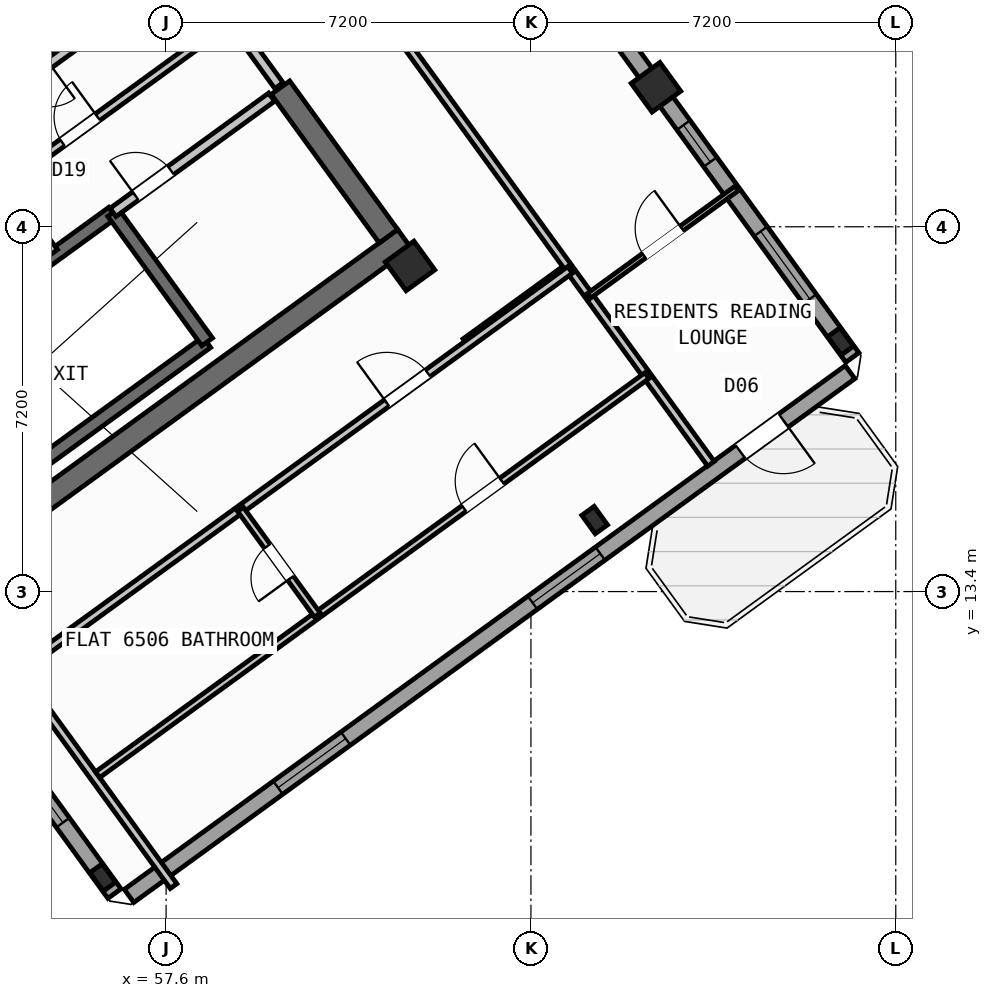
"""IFC4 building model, lengths in metres.
Left out: names, types, materials, properties, quantities, classifications, styles, units other than length and angle.
Written with IfcOpenShell. Run it as: python <this file> out.ifc"""

import sys

from ifc_helpers import new_model, si_unit, direction, frame, frame_2d, origin, origin_2d, place, context, subcontext, project, spatial, rectangle, hollow_rectangle, i_section, extrude, source, transform, mapped, element, fill, save


model = new_model("IFC4")
c1 = context("Model", 3, precision=1e-05, world=origin(), true_north=direction((0.0, 1.0)))
c2 = subcontext(c1, "Body", "Model", "MODEL_VIEW")
j1 = project(units=[si_unit("LENGTHUNIT", "METRE"), si_unit("PLANEANGLEUNIT", "RADIAN")], contexts=[c1])
p1 = place(None, origin())
s1 = spatial("IfcSite", under=j1, at=p1, CompositionType="ELEMENT")
p2 = place(p1, origin())
s2 = spatial("IfcBuilding", under=s1, at=p2, CompositionType="ELEMENT")
p3 = place(p2, frame((0.0, 0.0, 259.2)))
s3 = spatial("IfcBuildingStorey", under=s2, at=p3, CompositionType="ELEMENT", Elevation=259.2)
p4 = place(p3, frame((52.399, 13.169, 0.0), z_axis=(0.0, 0.0, 1.0), x_axis=(0.809022352778, 0.587777877013, 0.0)))
e1 = element("IfcWall", 1, at=p4, inside=s3, PredefinedType="SHEAR", context=c2, shape_type="SweptSolid", body=[
    extrude(rectangle(XDim=12.24, YDim=0.45, at=frame_2d((6.12, 0.0))), origin(), (0.0, 0.0, 1.0), 3.35),
])
p5 = place(p3, frame((61.988, 20.413, 0.0), z_axis=(0.0, 0.0, 1.0), x_axis=(-0.587819244441, 0.808992296542, 0.0)))
e2 = element("IfcWall", 2, at=p5, inside=s3, PredefinedType="SHEAR", context=c2, shape_type="SweptSolid", body=[
    extrude(rectangle(XDim=3.625, YDim=0.45, at=frame_2d((1.812, 0.0))), origin(), (0.0, 0.0, 1.0), 3.35),
])
m1 = source(origin(), c2, "Body", "SweptSolid", [
    extrude(i_section(OverallWidth=0.3, OverallDepth=0.45, WebThickness=0.014, FlangeThickness=0.026, at=origin_2d()), origin(), (0.0, 0.0, 1.0), 3.6),
])
for number, where, z_axis, x_axis in (
    (3, (56.35, 7.758, 0.0), (0.0, 0.0, 1.0), (0.809, 0.588, 0.0)),
    (4, (66.058, 14.811, 0.0), (0.0, 0.0, 1.0), (0.809, 0.588, 0.0)),
):
    element("IfcColumn", number, at=place(p3, frame(where, z_axis=z_axis, x_axis=x_axis)), inside=s3, PredefinedType="COLUMN", context=c2, shape_type="MappedRepresentation", body=[
        mapped(m1, transform((0.0, 0.0, 0.0), scale=1.0)),
    ])
m2 = source(origin(), c2, "Body", "SweptSolid", [
    extrude(hollow_rectangle(XDim=0.7, YDim=0.7, WallThickness=0.028, at=origin_2d()), origin(), (0.0, 0.0, 1.0), 3.6),
])
p6 = place(p3, frame((62.414, 19.827, 0.0), z_axis=(0.0, 0.0, 1.0), x_axis=(0.809016994375, 0.587785252292, 0.0)))
e5 = element("IfcColumn", 5, at=p6, inside=s3, PredefinedType="COLUMN", context=c2, shape_type="MappedRepresentation", body=[
    mapped(m2, transform((0.0, 0.0, 0.0), scale=1.0)),
])
p7 = place(p3, frame((70.912, 18.338, 0.0), z_axis=(0.0, 0.0, 1.0), x_axis=(0.809016994375, 0.587785252292, 0.0)))
e6 = element("IfcColumn", 6, at=p7, inside=s3, PredefinedType="COLUMN", context=c2, shape_type="MappedRepresentation", body=[
    mapped(m1, transform((0.0, 0.0, 0.0), scale=1.0)),
])
p8 = place(p3, frame((67.268, 23.354, 0.0), z_axis=(0.0, 0.0, 1.0), x_axis=(0.809016994375, 0.587785252292, 0.0)))
e7 = element("IfcColumn", 7, at=p8, inside=s3, PredefinedType="COLUMN", context=c2, shape_type="MappedRepresentation", body=[
    mapped(m2, transform((0.0, 0.0, 0.0), scale=1.0)),
])
p9 = place(p3, frame((58.455, 35.484, 0.0), z_axis=(0.0, 0.0, 1.0), x_axis=(0.587783625747, -0.809018176127, 0.0)))
e8 = element("IfcWall", 8, at=p9, inside=s3, PredefinedType="STANDARD", context=c2, shape_type="SweptSolid", body=[
    extrude(rectangle(XDim=21.587, YDim=0.32, at=frame_2d((10.794, 0.0))), origin(), (0.0, 0.0, 1.0), 3.35),
])
p10 = place(p9, frame((1.744, 0.0, 0.9)))
e9 = element("IfcOpeningElement", 9, at=p10, cuts=e8, PredefinedType="OPENING", context=c2, shape_type="SweptSolid", body=[
    extrude(rectangle(XDim=1.65, YDim=1.45, at=frame_2d((0.825, 0.725))), frame((0.0, 0.17, 0.0), z_axis=(0.0, -1.0, 0.0), x_axis=(1.0, 0.0, 0.0)), (0.0, 0.0, 1.0), 0.34),
])
p11 = place(p9, frame((4.694, 0.0, 0.9)))
e10 = element("IfcOpeningElement", 10, at=p11, cuts=e8, PredefinedType="OPENING", context=c2, shape_type="SweptSolid", body=[
    extrude(rectangle(XDim=1.65, YDim=1.45, at=frame_2d((0.825, 0.725))), frame((0.0, 0.17, 0.0), z_axis=(0.0, -1.0, 0.0), x_axis=(1.0, 0.0, 0.0)), (0.0, 0.0, 1.0), 0.34),
])
p12 = place(p9, frame((11.934, 0.0, 0.95)))
e11 = element("IfcOpeningElement", 11, at=p12, cuts=e8, PredefinedType="OPENING", context=c2, shape_type="SweptSolid", body=[
    extrude(rectangle(XDim=1.95, YDim=1.35, at=frame_2d((0.975, 0.675))), frame((0.0, 0.17, 0.0), z_axis=(0.0, -1.0, 0.0), x_axis=(1.0, 0.0, 0.0)), (0.0, 0.0, 1.0), 0.34),
])
p13 = place(p9, frame((15.917, 0.0, 1.0)))
e12 = element("IfcOpeningElement", 12, at=p13, cuts=e8, PredefinedType="OPENING", context=c2, shape_type="SweptSolid", body=[
    extrude(rectangle(XDim=0.9, YDim=1.25, at=frame_2d((0.45, 0.625))), frame((0.0, 0.17, 0.0), z_axis=(0.0, -1.0, 0.0), x_axis=(1.0, 0.0, 0.0)), (0.0, 0.0, 1.0), 0.34),
])
p14 = place(p9, frame((18.51, 0.0, 0.9)))
e13 = element("IfcOpeningElement", 13, at=p14, cuts=e8, PredefinedType="OPENING", context=c2, shape_type="SweptSolid", body=[
    extrude(rectangle(XDim=1.65, YDim=1.45, at=frame_2d((0.825, 0.725))), frame((0.0, 0.17, 0.0), z_axis=(0.0, -1.0, 0.0), x_axis=(1.0, 0.0, 0.0)), (0.0, 0.0, 1.0), 0.34),
])
p15 = place(p3, frame((71.098, 17.731, 0.0), z_axis=(0.0, 0.0, 1.0), x_axis=(-0.809021120468, -0.587779573171, 0.0)))
e14 = element("IfcWall", 14, at=p15, inside=s3, PredefinedType="STANDARD", context=c2, shape_type="SweptSolid", body=[
    extrude(rectangle(XDim=17.588, YDim=0.32, at=frame_2d((8.794, 0.0))), origin(), (0.0, 0.0, 1.0), 3.35),
])
p16 = place(p15, frame((1.624, 0.0, 0.0)))
e15 = element("IfcOpeningElement", 15, at=p16, cuts=e14, PredefinedType="OPENING", context=c2, shape_type="SweptSolid", body=[
    extrude(rectangle(XDim=1.05, YDim=2.15, at=frame_2d((0.525, 1.075))), frame((0.0, 0.17, 0.0), z_axis=(0.0, -1.0, 0.0), x_axis=(1.0, 0.0, 0.0)), (0.0, 0.0, 1.0), 0.34),
])
p17 = place(p15, frame((6.094, 0.0, 0.9)))
e16 = element("IfcOpeningElement", 16, at=p17, cuts=e14, PredefinedType="OPENING", context=c2, shape_type="SweptSolid", body=[
    extrude(rectangle(XDim=1.65, YDim=1.45, at=frame_2d((0.825, 0.725))), frame((0.0, 0.17, 0.0), z_axis=(0.0, -1.0, 0.0), x_axis=(1.0, 0.0, 0.0)), (0.0, 0.0, 1.0), 0.34),
])
p18 = place(p15, frame((12.304, 0.0, 0.9)))
e17 = element("IfcOpeningElement", 17, at=p18, cuts=e14, PredefinedType="OPENING", context=c2, shape_type="SweptSolid", body=[
    extrude(rectangle(XDim=1.65, YDim=1.45, at=frame_2d((0.825, 0.725))), frame((0.0, 0.17, 0.0), z_axis=(0.0, -1.0, 0.0), x_axis=(1.0, 0.0, 0.0)), (0.0, 0.0, 1.0), 0.34),
])
p19 = place(p3, frame((56.581, 7.439, 0.0), z_axis=(0.0, 0.0, 1.0), x_axis=(-0.587776558368, 0.809023310809, 0.0)))
e18 = element("IfcWall", 18, at=p19, inside=s3, PredefinedType="STANDARD", context=c2, shape_type="SweptSolid", body=[
    extrude(rectangle(XDim=7.385, YDim=0.32, at=frame_2d((3.693, 0.0))), origin(), (0.0, 0.0, 1.0), 3.35),
])
p20 = place(p19, frame((1.731, 0.0, 0.9)))
e19 = element("IfcOpeningElement", 19, at=p20, cuts=e18, PredefinedType="OPENING", context=c2, shape_type="SweptSolid", body=[
    extrude(rectangle(XDim=1.65, YDim=1.45, at=frame_2d((0.825, 0.725))), frame((0.0, 0.17, 0.0), z_axis=(0.0, -1.0, 0.0), x_axis=(1.0, 0.0, 0.0)), (0.0, 0.0, 1.0), 0.34),
])
p21 = place(p3, frame((49.863, 23.44, 0.0), z_axis=(0.0, 0.0, 1.0), x_axis=(0.809003474932, 0.587803859759, 0.0)))
e20 = element("IfcWall", 20, at=p21, inside=s3, PredefinedType="SHEAR", context=c2, shape_type="SweptSolid", body=[
    extrude(rectangle(XDim=7.46, YDim=0.26, at=frame_2d((3.73, 0.0))), origin(), (0.0, 0.0, 1.0), 3.35),
])
p22 = place(p21, frame((0.36, 0.0, 0.0)))
e21 = element("IfcOpeningElement", 21, at=p22, cuts=e20, PredefinedType="OPENING", context=c2, shape_type="SweptSolid", body=[
    extrude(rectangle(XDim=0.86, YDim=2.05, at=frame_2d((0.43, 1.025))), frame((0.0, 0.14, 0.0), z_axis=(0.0, -1.0, 0.0), x_axis=(1.0, 0.0, 0.0)), (0.0, 0.0, 1.0), 0.28),
])
p23 = place(p3, frame((52.472, 14.013, 0.0), z_axis=(0.0, 0.0, 1.0), x_axis=(0.809028366311, 0.587769599847, 0.0)))
e22 = element("IfcWall", 22, at=p23, inside=s3, PredefinedType="SHEAR", context=c2, shape_type="SweptSolid", body=[
    extrude(rectangle(XDim=7.33, YDim=0.26, at=frame_2d((3.665, 0.0))), origin(), (0.0, 0.0, 1.0), 3.35),
])
p24 = place(p3, frame((50.615, 16.57, 0.0), z_axis=(0.0, 0.0, 1.0), x_axis=(0.809028366311, 0.587769599847, 0.0)))
e23 = element("IfcWall", 23, at=p24, inside=s3, PredefinedType="SHEAR", context=c2, shape_type="SweptSolid", body=[
    extrude(rectangle(XDim=7.33, YDim=0.26, at=frame_2d((3.665, 0.0))), origin(), (0.0, 0.0, 1.0), 3.35),
])
p25 = place(p24, frame((0.22, 0.0, 0.0)))
e24 = element("IfcOpeningElement", 24, at=p25, cuts=e23, PredefinedType="OPENING", context=c2, shape_type="SweptSolid", body=[
    extrude(rectangle(XDim=1.1, YDim=2.1, at=frame_2d((0.55, 1.05))), frame((0.0, 0.14, 0.0), z_axis=(0.0, -1.0, 0.0), x_axis=(1.0, 0.0, 0.0)), (0.0, 0.0, 1.0), 0.28),
])
p26 = place(p3, frame((58.41, 18.327, 0.0), z_axis=(0.0, 0.0, 1.0), x_axis=(-0.58776738483, 0.809029975545, 0.0)))
e25 = element("IfcWall", 25, at=p26, inside=s3, PredefinedType="SHEAR", context=c2, shape_type="SweptSolid", body=[
    extrude(rectangle(XDim=3.16, YDim=0.26, at=frame_2d((1.58, 0.0))), origin(), (0.0, 0.0, 1.0), 3.35),
])
p27 = place(p3, frame((56.553, 20.884, 0.0), z_axis=(0.0, 0.0, 1.0), x_axis=(0.809041669066, 0.587751288995, 0.0)))
e26 = element("IfcWall", 26, at=p27, inside=s3, PredefinedType="STANDARD", context=c2, shape_type="SweptSolid", body=[
    extrude(rectangle(XDim=3.868, YDim=0.2, at=frame_2d((1.934, 0.0))), origin(), (0.0, 0.0, 1.0), 3.34),
])
p28 = place(p27, frame((0.55, 0.0, 0.0)))
e27 = element("IfcOpeningElement", 27, at=p28, cuts=e26, PredefinedType="OPENING", context=c2, shape_type="SweptSolid", body=[
    extrude(rectangle(XDim=0.86, YDim=2.05, at=frame_2d((0.43, 1.025))), frame((0.0, 0.11, 0.0), z_axis=(0.0, -1.0, 0.0), x_axis=(1.0, 0.0, 0.0)), (0.0, 0.0, 1.0), 0.22),
])
p29 = place(p3, frame((54.421, 21.436, 0.0), z_axis=(0.0, 0.0, 1.0), x_axis=(0.809013710463, 0.587789772183, 0.0)))
e28 = element("IfcWall", 28, at=p29, inside=s3, PredefinedType="PARTITIONING", context=c2, shape_type="SweptSolid", body=[
    extrude(rectangle(XDim=5.36, YDim=0.16, at=frame_2d((2.68, 0.0))), origin(), (0.0, 0.0, 1.0), 3.34),
])
p30 = place(p29, frame((1.4, 0.0, 0.0)))
e29 = element("IfcOpeningElement", 29, at=p30, cuts=e28, PredefinedType="OPENING", context=c2, shape_type="SweptSolid", body=[
    extrude(rectangle(XDim=0.86, YDim=2.05, at=frame_2d((0.43, 1.025))), frame((0.0, 0.09, 0.0), z_axis=(0.0, -1.0, 0.0), x_axis=(1.0, 0.0, 0.0)), (0.0, 0.0, 1.0), 0.18),
])
p31 = place(p3, frame((55.391, 20.102, 0.0), z_axis=(0.0, 0.0, 1.0), x_axis=(-0.58778447739, 0.809017557374, 0.0)))
e30 = element("IfcWall", 30, at=p31, inside=s3, PredefinedType="PARTITIONING", context=c2, shape_type="SweptSolid", body=[
    extrude(rectangle(XDim=1.65, YDim=0.16, at=frame_2d((0.825, 0.0))), origin(), (0.0, 0.0, 1.0), 3.34),
])
p32 = place(p3, frame((53.425, 22.468, 0.0), z_axis=(0.0, 0.0, 1.0), x_axis=(0.809015945709, 0.587786695655, 0.0)))
e31 = element("IfcWall", 31, at=p32, inside=s3, PredefinedType="STANDARD", context=c2, shape_type="SweptSolid", body=[
    extrude(rectangle(XDim=5.468, YDim=0.2, at=frame_2d((2.734, 0.0))), origin(), (0.0, 0.0, 1.0), 3.34),
])
p33 = place(p32, frame((4.4, 0.0, 0.0)))
e32 = element("IfcOpeningElement", 32, at=p33, cuts=e31, PredefinedType="OPENING", context=c2, shape_type="SweptSolid", body=[
    extrude(rectangle(XDim=0.86, YDim=2.05, at=frame_2d((0.43, 1.025))), frame((0.0, 0.11, 0.0), z_axis=(0.0, -1.0, 0.0), x_axis=(1.0, 0.0, 0.0)), (0.0, 0.0, 1.0), 0.22),
])
p34 = place(p32, frame((1.45, 0.0, 0.0)))
e33 = element("IfcOpeningElement", 33, at=p34, cuts=e31, PredefinedType="OPENING", context=c2, shape_type="SweptSolid", body=[
    extrude(rectangle(XDim=0.86, YDim=2.05, at=frame_2d((0.43, 1.025))), frame((0.0, 0.11, 0.0), z_axis=(0.0, -1.0, 0.0), x_axis=(1.0, 0.0, 0.0)), (0.0, 0.0, 1.0), 0.22),
])
p35 = place(p3, frame((59.827, 23.386, 0.0), z_axis=(0.0, 0.0, 1.0), x_axis=(-0.587803840107, 0.809003489211, 0.0)))
e34 = element("IfcWall", 34, at=p35, inside=s3, PredefinedType="STANDARD", context=c2, shape_type="SweptSolid", body=[
    extrude(rectangle(XDim=2.96, YDim=0.2, at=frame_2d((1.48, 0.0))), origin(), (0.0, 0.0, 1.0), 3.34),
])
p36 = place(p35, frame((1.68, 0.0, 0.0)))
e35 = element("IfcOpeningElement", 35, at=p36, cuts=e34, PredefinedType="OPENING", context=c2, shape_type="SweptSolid", body=[
    extrude(rectangle(XDim=1.0, YDim=2.1, at=frame_2d((0.5, 1.05))), frame((0.0, 0.11, 0.0), z_axis=(0.0, -1.0, 0.0), x_axis=(1.0, 0.0, 0.0)), (0.0, 0.0, 1.0), 0.22),
])
p37 = place(p3, frame((63.507, 18.322, 0.0), z_axis=(0.0, 0.0, 1.0), x_axis=(0.809034604122, 0.587761013791, 0.0)))
e36 = element("IfcWall", 36, at=p37, inside=s3, PredefinedType="PARTITIONING", context=c2, shape_type="SweptSolid", body=[
    extrude(rectangle(XDim=2.51, YDim=0.16, at=frame_2d((1.255, 0.0))), origin(), (0.0, 0.0, 1.0), 3.34),
])
p38 = place(p3, frame((68.353, 15.922, 0.0), z_axis=(0.0, 0.0, 1.0), x_axis=(-0.587783168305, 0.809018508476, 0.0)))
e37 = element("IfcWall", 37, at=p38, inside=s3, PredefinedType="PARTITIONING", context=c2, shape_type="SweptSolid", body=[
    extrude(rectangle(XDim=10.65, YDim=0.16, at=frame_2d((5.325, 0.0))), origin(), (0.0, 0.0, 1.0), 3.34),
])
p39 = place(p3, frame((65.944, 19.238, 0.0), z_axis=(0.0, 0.0, 1.0), x_axis=(0.809013833588, 0.587789602718, 0.0)))
e38 = element("IfcWall", 38, at=p39, inside=s3, PredefinedType="PARTITIONING", context=c2, shape_type="SweptSolid", body=[
    extrude(rectangle(XDim=3.61, YDim=0.11, at=frame_2d((1.805, 0.0))), origin(), (0.0, 0.0, 1.0), 3.34),
])
p40 = place(p39, frame((1.345, 0.0, 0.0)))
e39 = element("IfcOpeningElement", 39, at=p40, cuts=e38, PredefinedType="OPENING", context=c2, shape_type="SweptSolid", body=[
    extrude(rectangle(XDim=0.92, YDim=2.08, at=frame_2d((0.46, 1.04))), frame((0.0, 0.065, 0.0), z_axis=(0.0, -1.0, 0.0), x_axis=(1.0, 0.0, 0.0)), (0.0, 0.0, 1.0), 0.13),
])
p41 = place(p3, frame((53.705, 11.126, 0.0), z_axis=(0.0, 0.0, 1.0), x_axis=(0.809014504436, 0.587788679384, 0.0)))
e40 = element("IfcWall", 40, at=p41, inside=s3, PredefinedType="PARTITIONING", context=c2, shape_type="SweptSolid", body=[
    extrude(rectangle(XDim=14.67, YDim=0.16, at=frame_2d((7.335, 0.0))), origin(), (0.0, 0.0, 1.0), 3.34),
])
p42 = place(p41, frame((10.2, 0.0, 0.0)))
e41 = element("IfcOpeningElement", 41, at=p42, cuts=e40, PredefinedType="OPENING", context=c2, shape_type="SweptSolid", body=[
    extrude(rectangle(XDim=1.0, YDim=2.1, at=frame_2d((0.5, 1.05))), frame((0.0, 0.09, 0.0), z_axis=(0.0, -1.0, 0.0), x_axis=(1.0, 0.0, 0.0)), (0.0, 0.0, 1.0), 0.18),
])
p43 = place(p3, frame((57.747, 7.586, 0.0), z_axis=(0.0, 0.0, 1.0), x_axis=(-0.587784893399, 0.809017255126, 0.0)))
e42 = element("IfcWall", 42, at=p43, inside=s3, PredefinedType="PARTITIONING", context=c2, shape_type="SweptSolid", body=[
    extrude(rectangle(XDim=5.48, YDim=0.16, at=frame_2d((2.74, 0.0))), origin(), (0.0, 0.0, 1.0), 3.34),
])
p44 = place(p3, frame((56.249, 9.785, 0.0), z_axis=(0.0, 0.0, 1.0), x_axis=(0.809011747655, 0.587792473715, 0.0)))
e43 = element("IfcWall", 43, at=p44, inside=s3, PredefinedType="PLUMBINGWALL", context=c2, shape_type="SweptSolid", body=[
    extrude(rectangle(XDim=13.4, YDim=0.14, at=frame_2d((6.7, 0.0))), origin(), (0.0, 0.0, 1.0), 3.34),
])
p45 = place(p44, frame((8.94, 0.0, 0.0)))
e44 = element("IfcOpeningElement", 44, at=p45, cuts=e43, PredefinedType="OPENING", context=c2, shape_type="SweptSolid", body=[
    extrude(rectangle(XDim=0.92, YDim=2.08, at=frame_2d((0.46, 1.04))), frame((0.0, 0.08, 0.0), z_axis=(0.0, -1.0, 0.0), x_axis=(1.0, 0.0, 0.0)), (0.0, 0.0, 1.0), 0.16),
])
p46 = place(p3, frame((60.585, 12.936, 0.0), z_axis=(0.0, 0.0, 1.0), x_axis=(-0.587772116736, 0.809026537752, 0.0)))
e45 = element("IfcWall", 45, at=p46, inside=s3, PredefinedType="PLUMBINGWALL", context=c2, shape_type="SweptSolid", body=[
    extrude(rectangle(XDim=2.58, YDim=0.14, at=frame_2d((1.29, 0.0))), origin(), (0.0, 0.0, 1.0), 3.34),
])
p47 = place(p46, frame((0.9, 0.0, 0.0)))
e46 = element("IfcOpeningElement", 46, at=p47, cuts=e45, PredefinedType="OPENING", context=c2, shape_type="SweptSolid", body=[
    extrude(rectangle(XDim=0.78, YDim=2.05, at=frame_2d((0.39, 1.025))), frame((0.0, 0.08, 0.0), z_axis=(0.0, -1.0, 0.0), x_axis=(1.0, 0.0, 0.0)), (0.0, 0.0, 1.0), 0.16),
])
m3 = source(origin(), c2, "Body", "SweptSolid", [
    extrude(rectangle(XDim=1.05, YDim=2.15, at=frame_2d((0.525, 1.075))), frame((0.0, 0.025, 0.0), z_axis=(0.0, -1.0, 0.0), x_axis=(1.0, 0.0, 0.0)), (0.0, 0.0, 1.0), 0.05),
])
p48 = place(p16, origin())
e47 = element("IfcDoor", 47, at=p48, inside=s3, OperationType="SINGLE_SWING_LEFT", PredefinedType="DOOR", context=c2, shape_type="MappedRepresentation", body=[
    mapped(m3, transform((0.0, 0.0, 0.0), scale=1.0)),
])
fill(e15, e47)
m4 = source(origin(), c2, "Body", "SweptSolid", [
    extrude(rectangle(XDim=0.9, YDim=1.25, at=frame_2d((0.45, 0.625))), frame((0.0, 0.03, 0.0), z_axis=(0.0, -1.0, 0.0), x_axis=(1.0, 0.0, 0.0)), (0.0, 0.0, 1.0), 0.06),
])
p49 = place(p13, origin())
e48 = element("IfcWindow", 48, at=p49, inside=s3, PartitioningType="SINGLE_PANEL", PredefinedType="WINDOW", context=c2, shape_type="MappedRepresentation", body=[
    mapped(m4, transform((0.0, 0.0, 0.0), scale=1.0)),
])
fill(e12, e48)
m5 = source(origin(), c2, "Body", "SweptSolid", [
    extrude(rectangle(XDim=1.65, YDim=1.45, at=frame_2d((0.825, 0.725))), frame((0.0, 0.03, 0.0), z_axis=(0.0, -1.0, 0.0), x_axis=(1.0, 0.0, 0.0)), (0.0, 0.0, 1.0), 0.06),
])
p50 = place(p14, origin())
e49 = element("IfcWindow", 49, at=p50, inside=s3, PartitioningType="SINGLE_PANEL", PredefinedType="WINDOW", context=c2, shape_type="MappedRepresentation", body=[
    mapped(m5, transform((0.0, 0.0, 0.0), scale=1.0)),
])
fill(e13, e49)
p51 = place(p17, origin())
e50 = element("IfcWindow", 50, at=p51, inside=s3, PartitioningType="SINGLE_PANEL", PredefinedType="WINDOW", context=c2, shape_type="MappedRepresentation", body=[
    mapped(m5, transform((0.0, 0.0, 0.0), scale=1.0)),
])
fill(e16, e50)
p52 = place(p18, origin())
e51 = element("IfcWindow", 51, at=p52, inside=s3, PartitioningType="SINGLE_PANEL", PredefinedType="WINDOW", context=c2, shape_type="MappedRepresentation", body=[
    mapped(m5, transform((0.0, 0.0, 0.0), scale=1.0)),
])
fill(e17, e51)
p53 = place(p20, origin())
e52 = element("IfcWindow", 52, at=p53, inside=s3, PartitioningType="SINGLE_PANEL", PredefinedType="WINDOW", context=c2, shape_type="MappedRepresentation", body=[
    mapped(m5, transform((0.0, 0.0, 0.0), scale=1.0)),
])
fill(e19, e52)
m6 = source(origin(), c2, "Body", "SweptSolid", [
    extrude(rectangle(XDim=0.86, YDim=2.05, at=frame_2d((0.43, 1.025))), frame((0.0, 0.025, 0.0), z_axis=(0.0, -1.0, 0.0), x_axis=(1.0, 0.0, 0.0)), (0.0, 0.0, 1.0), 0.05),
])
p54 = place(p30, origin())
e53 = element("IfcDoor", 53, at=p54, inside=s3, OperationType="SINGLE_SWING_RIGHT", PredefinedType="DOOR", context=c2, shape_type="MappedRepresentation", body=[
    mapped(m6, transform((0.0, 0.0, 0.0), scale=1.0)),
])
fill(e29, e53)
p55 = place(p28, origin())
e54 = element("IfcDoor", 54, at=p55, inside=s3, OperationType="SINGLE_SWING_LEFT", PredefinedType="DOOR", context=c2, shape_type="MappedRepresentation", body=[
    mapped(m6, transform((0.0, 0.0, 0.0), scale=1.0)),
])
fill(e27, e54)
m7 = source(origin(), c2, "Body", "SweptSolid", [
    extrude(rectangle(XDim=0.92, YDim=2.08, at=frame_2d((0.46, 1.04))), frame((0.0, 0.025, 0.0), z_axis=(0.0, -1.0, 0.0), x_axis=(1.0, 0.0, 0.0)), (0.0, 0.0, 1.0), 0.05),
])
p56 = place(p40, origin())
e55 = element("IfcDoor", 55, at=p56, inside=s3, OperationType="SINGLE_SWING_RIGHT", PredefinedType="DOOR", context=c2, shape_type="MappedRepresentation", body=[
    mapped(m7, transform((0.0, 0.0, 0.0), scale=1.0)),
])
fill(e39, e55)
m8 = source(origin(), c2, "Body", "SweptSolid", [
    extrude(rectangle(XDim=1.0, YDim=2.1, at=frame_2d((0.5, 1.05))), frame((0.0, 0.025, 0.0), z_axis=(0.0, -1.0, 0.0), x_axis=(1.0, 0.0, 0.0)), (0.0, 0.0, 1.0), 0.05),
])
p57 = place(p42, origin())
e56 = element("IfcDoor", 56, at=p57, inside=s3, OperationType="SINGLE_SWING_LEFT", PredefinedType="DOOR", context=c2, shape_type="MappedRepresentation", body=[
    mapped(m8, transform((0.0, 0.0, 0.0), scale=1.0)),
])
fill(e41, e56)
p58 = place(p45, origin())
e57 = element("IfcDoor", 57, at=p58, inside=s3, OperationType="SINGLE_SWING_RIGHT", PredefinedType="DOOR", context=c2, shape_type="MappedRepresentation", body=[
    mapped(m7, transform((0.0, 0.0, 0.0), scale=1.0)),
])
fill(e44, e57)
m9 = source(origin(), c2, "Body", "SweptSolid", [
    extrude(rectangle(XDim=0.78, YDim=2.05, at=frame_2d((0.39, 1.025))), frame((0.0, 0.025, 0.0), z_axis=(0.0, -1.0, 0.0), x_axis=(1.0, 0.0, 0.0)), (0.0, 0.0, 1.0), 0.05),
])
p59 = place(p47, origin())
e58 = element("IfcDoor", 58, at=p59, inside=s3, OperationType="SINGLE_SWING_LEFT", PredefinedType="DOOR", context=c2, shape_type="MappedRepresentation", body=[
    mapped(m9, transform((0.0, 0.0, 0.0), scale=1.0)),
])
fill(e46, e58)
save(model, sys.argv[1])
